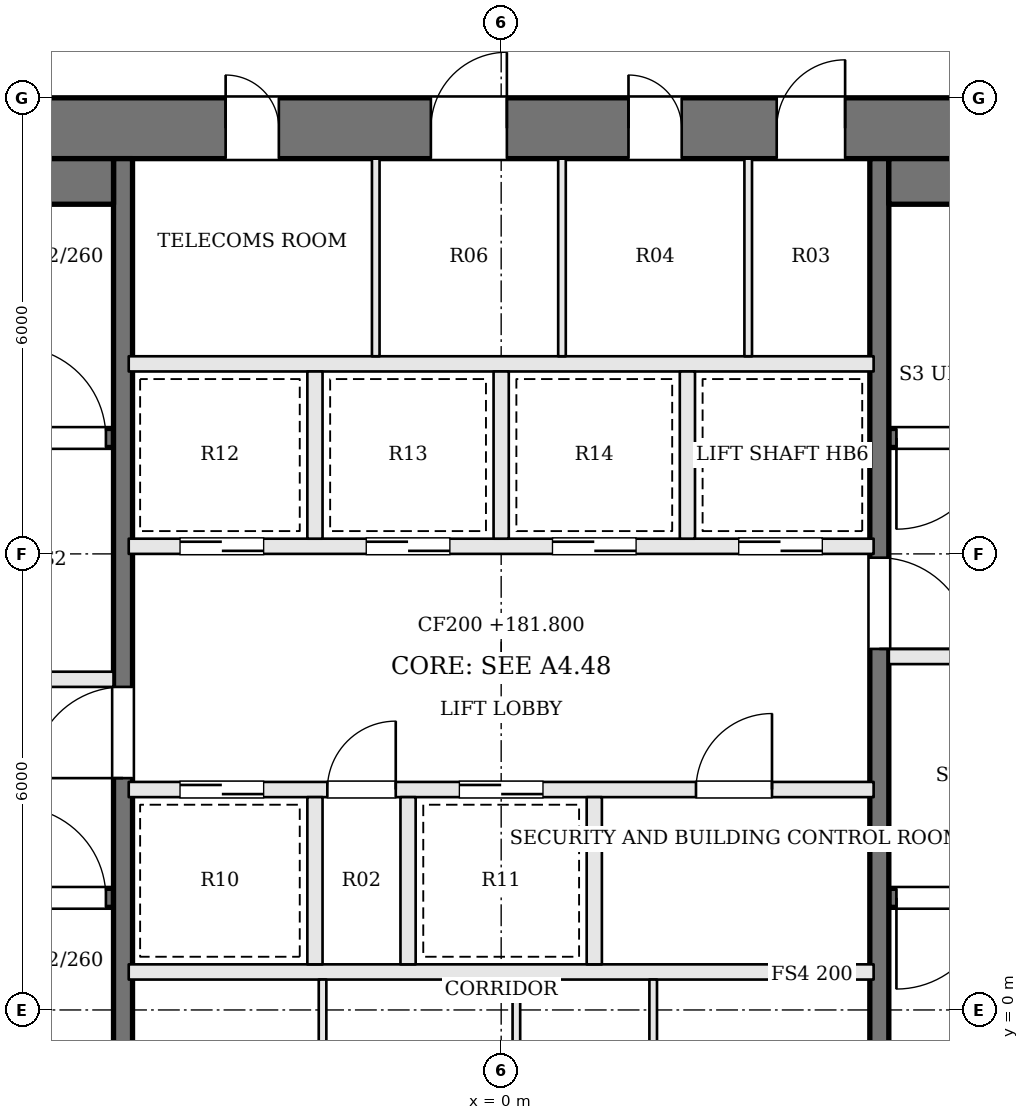
"""IFC4 building model, lengths in metres.
Left out: names, types, materials, properties, quantities, classifications, styles, units other than length and angle.
Written with IfcOpenShell. Run it as: python <this file> out.ifc"""

import sys

from ifc_helpers import new_model, si_unit, direction, frame, frame_2d, origin, place, context, subcontext, project, spatial, rectangle, extrude, element, fill, save


model = new_model("IFC4")
c1 = context("Model", 3, precision=1e-05, world=origin(), true_north=direction((0.0, 1.0)))
c2 = subcontext(c1, "Body", "Model", "MODEL_VIEW")
j1 = project(units=[si_unit("LENGTHUNIT", "METRE"), si_unit("PLANEANGLEUNIT", "RADIAN")], contexts=[c1])
p1 = place(None, origin())
s1 = spatial("IfcSite", under=j1, at=p1, CompositionType="ELEMENT")
p2 = place(p1, origin())
s2 = spatial("IfcBuilding", under=s1, at=p2, CompositionType="ELEMENT")
p3 = place(p2, frame((0.0, 0.0, 181.8)))
s3 = spatial("IfcBuildingStorey", under=s2, at=p3, CompositionType="ELEMENT", Elevation=181.8)
p4 = place(p3, frame((-13.0, 11.6, 0.0), z_axis=(0.0, 0.0, 1.0), x_axis=(1.0, 0.0, 0.0)))
e1 = element("IfcWall", 1, at=p4, inside=s3, PredefinedType="SHEAR", context=c2, shape_type="SweptSolid", body=[
    extrude(rectangle(XDim=26.0, YDim=0.8, at=frame_2d((13.0, 0.0))), origin(), (0.0, 0.0, 1.0), 3.9),
])
p5 = place(p4, frame((9.375, 0.0, 0.0)))
e2 = element("IfcOpeningElement", 2, at=p5, cuts=e1, PredefinedType="OPENING", context=c2, shape_type="SweptSolid", body=[
    extrude(rectangle(XDim=0.7, YDim=2.1, at=frame_2d((0.35, 1.05))), frame((0.0, 0.41, 0.0), z_axis=(0.0, -1.0, 0.0), x_axis=(1.0, 0.0, 0.0)), (0.0, 0.0, 1.0), 0.82),
])
p6 = place(p4, frame((12.075, 0.0, 0.0)))
e3 = element("IfcOpeningElement", 3, at=p6, cuts=e1, PredefinedType="OPENING", context=c2, shape_type="SweptSolid", body=[
    extrude(rectangle(XDim=1.0, YDim=2.1, at=frame_2d((0.5, 1.05))), frame((0.0, 0.41, 0.0), z_axis=(0.0, -1.0, 0.0), x_axis=(1.0, 0.0, 0.0)), (0.0, 0.0, 1.0), 0.82),
])
p7 = place(p4, frame((14.675, 0.0, 0.0)))
e4 = element("IfcOpeningElement", 4, at=p7, cuts=e1, PredefinedType="OPENING", context=c2, shape_type="SweptSolid", body=[
    extrude(rectangle(XDim=0.7, YDim=2.1, at=frame_2d((0.35, 1.05))), frame((0.0, 0.41, 0.0), z_axis=(0.0, -1.0, 0.0), x_axis=(1.0, 0.0, 0.0)), (0.0, 0.0, 1.0), 0.82),
])
p8 = place(p4, frame((16.625, 0.0, 0.0)))
e5 = element("IfcOpeningElement", 5, at=p8, cuts=e1, PredefinedType="OPENING", context=c2, shape_type="SweptSolid", body=[
    extrude(rectangle(XDim=0.9, YDim=2.1, at=frame_2d((0.45, 1.05))), frame((0.0, 0.41, 0.0), z_axis=(0.0, -1.0, 0.0), x_axis=(1.0, 0.0, 0.0)), (0.0, 0.0, 1.0), 0.82),
])
p9 = place(p3, frame((-12.2, 1.475, 0.0), z_axis=(0.0, 0.0, 1.0), x_axis=(1.0, 0.0, 0.0)))
e6 = element("IfcWall", 6, at=p9, inside=s3, PredefinedType="SOLIDWALL", context=c2, shape_type="SweptSolid", body=[
    extrude(rectangle(XDim=7.1, YDim=0.25, at=frame_2d((3.55, 0.0))), origin(), (0.0, 0.0, 1.0), 3.7),
])
p10 = place(p9, frame((5.8, 0.0, 0.0)))
e7 = element("IfcOpeningElement", 7, at=p10, cuts=e6, PredefinedType="OPENING", context=c2, shape_type="SweptSolid", body=[
    extrude(rectangle(XDim=1.2, YDim=2.1, at=frame_2d((0.6, 1.05))), frame((0.0, 0.135, 0.0), z_axis=(0.0, -1.0, 0.0), x_axis=(1.0, 0.0, 0.0)), (0.0, 0.0, 1.0), 0.27),
])
p11 = place(p3, frame((12.2, 7.525, 0.0), z_axis=(0.0, 0.0, 1.0), x_axis=(-1.0, 0.0, 0.0)))
e8 = element("IfcWall", 8, at=p11, inside=s3, PredefinedType="SOLIDWALL", context=c2, shape_type="SweptSolid", body=[
    extrude(rectangle(XDim=7.1, YDim=0.25, at=frame_2d((3.55, 0.0))), origin(), (0.0, 0.0, 1.0), 3.7),
])
p12 = place(p11, frame((5.8, 0.0, 0.0)))
e9 = element("IfcOpeningElement", 9, at=p12, cuts=e8, PredefinedType="OPENING", context=c2, shape_type="SweptSolid", body=[
    extrude(rectangle(XDim=1.2, YDim=2.1, at=frame_2d((0.6, 1.05))), frame((0.0, 0.135, 0.0), z_axis=(0.0, -1.0, 0.0), x_axis=(1.0, 0.0, 0.0)), (0.0, 0.0, 1.0), 0.27),
])
p13 = place(p3, frame((-12.2, 4.35, 0.0), z_axis=(0.0, 0.0, 1.0), x_axis=(1.0, 0.0, 0.0)))
e10 = element("IfcWall", 10, at=p13, inside=s3, PredefinedType="SOLIDWALL", context=c2, shape_type="SweptSolid", body=[
    extrude(rectangle(XDim=7.1, YDim=0.2, at=frame_2d((3.55, 0.0))), origin(), (0.0, 0.0, 1.0), 3.7),
])
p14 = place(p13, frame((4.4, 0.0, 0.0)))
e11 = element("IfcOpeningElement", 11, at=p14, cuts=e10, PredefinedType="OPENING", context=c2, shape_type="SweptSolid", body=[
    extrude(rectangle(XDim=1.2, YDim=2.1, at=frame_2d((0.6, 1.05))), frame((0.0, 0.11, 0.0), z_axis=(0.0, -1.0, 0.0), x_axis=(1.0, 0.0, 0.0)), (0.0, 0.0, 1.0), 0.22),
])
p15 = place(p13, frame((1.1, 0.0, 0.0)))
e12 = element("IfcOpeningElement", 12, at=p15, cuts=e10, PredefinedType="OPENING", context=c2, shape_type="SweptSolid", body=[
    extrude(rectangle(XDim=1.2, YDim=2.1, at=frame_2d((0.6, 1.05))), frame((0.0, 0.11, 0.0), z_axis=(0.0, -1.0, 0.0), x_axis=(1.0, 0.0, 0.0)), (0.0, 0.0, 1.0), 0.22),
])
p16 = place(p3, frame((12.2, 4.65, 0.0), z_axis=(0.0, 0.0, 1.0), x_axis=(-1.0, 0.0, 0.0)))
e13 = element("IfcWall", 13, at=p16, inside=s3, PredefinedType="SOLIDWALL", context=c2, shape_type="SweptSolid", body=[
    extrude(rectangle(XDim=7.1, YDim=0.2, at=frame_2d((3.55, 0.0))), origin(), (0.0, 0.0, 1.0), 3.7),
])
p17 = place(p16, frame((4.4, 0.0, 0.0)))
e14 = element("IfcOpeningElement", 14, at=p17, cuts=e13, PredefinedType="OPENING", context=c2, shape_type="SweptSolid", body=[
    extrude(rectangle(XDim=1.2, YDim=2.1, at=frame_2d((0.6, 1.05))), frame((0.0, 0.11, 0.0), z_axis=(0.0, -1.0, 0.0), x_axis=(1.0, 0.0, 0.0)), (0.0, 0.0, 1.0), 0.22),
])
p18 = place(p16, frame((1.1, 0.0, 0.0)))
e15 = element("IfcOpeningElement", 15, at=p18, cuts=e13, PredefinedType="OPENING", context=c2, shape_type="SweptSolid", body=[
    extrude(rectangle(XDim=1.2, YDim=2.1, at=frame_2d((0.6, 1.05))), frame((0.0, 0.11, 0.0), z_axis=(0.0, -1.0, 0.0), x_axis=(1.0, 0.0, 0.0)), (0.0, 0.0, 1.0), 0.22),
])
p19 = place(p3, frame((-12.2, 7.525, 0.0), z_axis=(0.0, 0.0, 1.0), x_axis=(1.0, 0.0, 0.0)))
e16 = element("IfcWall", 16, at=p19, inside=s3, PredefinedType="SOLIDWALL", context=c2, shape_type="SweptSolid", body=[
    extrude(rectangle(XDim=7.1, YDim=0.25, at=frame_2d((3.55, 0.0))), origin(), (0.0, 0.0, 1.0), 3.7),
])
p20 = place(p19, frame((5.8, 0.0, 0.0)))
e17 = element("IfcOpeningElement", 17, at=p20, cuts=e16, PredefinedType="OPENING", context=c2, shape_type="SweptSolid", body=[
    extrude(rectangle(XDim=1.2, YDim=2.1, at=frame_2d((0.6, 1.05))), frame((0.0, 0.135, 0.0), z_axis=(0.0, -1.0, 0.0), x_axis=(1.0, 0.0, 0.0)), (0.0, 0.0, 1.0), 0.27),
])
p21 = place(p3, frame((12.2, 1.475, 0.0), z_axis=(0.0, 0.0, 1.0), x_axis=(-1.0, 0.0, 0.0)))
e18 = element("IfcWall", 18, at=p21, inside=s3, PredefinedType="SOLIDWALL", context=c2, shape_type="SweptSolid", body=[
    extrude(rectangle(XDim=7.1, YDim=0.25, at=frame_2d((3.55, 0.0))), origin(), (0.0, 0.0, 1.0), 3.7),
])
p22 = place(p21, frame((5.8, 0.0, 0.0)))
e19 = element("IfcOpeningElement", 19, at=p22, cuts=e18, PredefinedType="OPENING", context=c2, shape_type="SweptSolid", body=[
    extrude(rectangle(XDim=1.2, YDim=2.1, at=frame_2d((0.6, 1.05))), frame((0.0, 0.135, 0.0), z_axis=(0.0, -1.0, 0.0), x_axis=(1.0, 0.0, 0.0)), (0.0, 0.0, 1.0), 0.27),
])
p23 = place(p3, frame((-4.975, -2.2, 0.0), z_axis=(0.0, 0.0, 1.0), x_axis=(0.0, 1.0, 0.0)))
e20 = element("IfcWall", 20, at=p23, inside=s3, PredefinedType="SOLIDWALL", context=c2, shape_type="SweptSolid", body=[
    extrude(rectangle(XDim=13.4, YDim=0.25, at=frame_2d((6.7, 0.0))), origin(), (0.0, 0.0, 1.0), 3.7),
])
p24 = place(p23, frame((5.25, 0.0, 0.0)))
e21 = element("IfcOpeningElement", 21, at=p24, cuts=e20, PredefinedType="OPENING", context=c2, shape_type="SweptSolid", body=[
    extrude(rectangle(XDim=1.2, YDim=2.1, at=frame_2d((0.6, 1.05))), frame((0.0, 0.135, 0.0), z_axis=(0.0, -1.0, 0.0), x_axis=(1.0, 0.0, 0.0)), (0.0, 0.0, 1.0), 0.27),
])
p25 = place(p3, frame((4.975, 11.2, 0.0), z_axis=(0.0, 0.0, 1.0), x_axis=(0.0, -1.0, 0.0)))
e22 = element("IfcWall", 22, at=p25, inside=s3, PredefinedType="SOLIDWALL", context=c2, shape_type="SweptSolid", body=[
    extrude(rectangle(XDim=13.4, YDim=0.25, at=frame_2d((6.7, 0.0))), origin(), (0.0, 0.0, 1.0), 3.7),
])
p26 = place(p25, frame((5.25, 0.0, 0.0)))
e23 = element("IfcOpeningElement", 23, at=p26, cuts=e22, PredefinedType="OPENING", context=c2, shape_type="SweptSolid", body=[
    extrude(rectangle(XDim=1.2, YDim=2.1, at=frame_2d((0.6, 1.05))), frame((0.0, 0.135, 0.0), z_axis=(0.0, -1.0, 0.0), x_axis=(1.0, 0.0, 0.0)), (0.0, 0.0, 1.0), 0.27),
])
for number, where, z_axis, x_axis in (
    (24, (-12.2, 10.9, 0.0), (0.0, 0.0, 1.0), (1.0, 0.0, 0.0)),
    (25, (12.2, 10.9, 0.0), (0.0, 0.0, 1.0), (-1.0, 0.0, 0.0)),
):
    element("IfcWall", number, at=place(p3, frame(where, z_axis=z_axis, x_axis=x_axis)), inside=s3, PredefinedType="SOLIDWALL", context=c2, shape_type="SweptSolid", body=[
        extrude(rectangle(XDim=7.1, YDim=0.6, at=frame_2d((3.55, 0.0))), origin(), (0.0, 0.0, 1.0), 3.7),
    ])
p27 = place(p3, frame((-4.9, 0.5, 0.0), z_axis=(0.0, 0.0, 1.0), x_axis=(1.0, 0.0, 0.0)))
e26 = element("IfcWall", 26, at=p27, inside=s3, PredefinedType="SOLIDWALL", context=c2, shape_type="SweptSolid", body=[
    extrude(rectangle(XDim=9.8, YDim=0.2, at=frame_2d((4.9, 0.0))), origin(), (0.0, 0.0, 1.0), 3.7),
])
p28 = place(p3, frame((-4.9, 2.9, 0.0), z_axis=(0.0, 0.0, 1.0), x_axis=(1.0, 0.0, 0.0)))
e27 = element("IfcWall", 27, at=p28, inside=s3, PredefinedType="SOLIDWALL", context=c2, shape_type="SweptSolid", body=[
    extrude(rectangle(XDim=9.8, YDim=0.2, at=frame_2d((4.9, 0.0))), origin(), (0.0, 0.0, 1.0), 3.7),
])
p29 = place(p28, frame((0.675, 0.0, 0.0)))
e28 = element("IfcOpeningElement", 28, at=p29, cuts=e27, PredefinedType="OPENING", context=c2, shape_type="SweptSolid", body=[
    extrude(rectangle(XDim=1.1, YDim=2.1, at=frame_2d((0.55, 1.05))), frame((0.0, 0.11, 0.0), z_axis=(0.0, -1.0, 0.0), x_axis=(1.0, 0.0, 0.0)), (0.0, 0.0, 1.0), 0.22),
])
p30 = place(p28, frame((2.613, 0.0, 0.0)))
e29 = element("IfcOpeningElement", 29, at=p30, cuts=e27, PredefinedType="OPENING", context=c2, shape_type="SweptSolid", body=[
    extrude(rectangle(XDim=0.9, YDim=2.1, at=frame_2d((0.45, 1.05))), frame((0.0, 0.11, 0.0), z_axis=(0.0, -1.0, 0.0), x_axis=(1.0, 0.0, 0.0)), (0.0, 0.0, 1.0), 0.22),
])
p31 = place(p28, frame((4.35, 0.0, 0.0)))
e30 = element("IfcOpeningElement", 30, at=p31, cuts=e27, PredefinedType="OPENING", context=c2, shape_type="SweptSolid", body=[
    extrude(rectangle(XDim=1.1, YDim=2.1, at=frame_2d((0.55, 1.05))), frame((0.0, 0.11, 0.0), z_axis=(0.0, -1.0, 0.0), x_axis=(1.0, 0.0, 0.0)), (0.0, 0.0, 1.0), 0.22),
])
p32 = place(p28, frame((7.463, 0.0, 0.0)))
e31 = element("IfcOpeningElement", 31, at=p32, cuts=e27, PredefinedType="OPENING", context=c2, shape_type="SweptSolid", body=[
    extrude(rectangle(XDim=1.0, YDim=2.1, at=frame_2d((0.5, 1.05))), frame((0.0, 0.11, 0.0), z_axis=(0.0, -1.0, 0.0), x_axis=(1.0, 0.0, 0.0)), (0.0, 0.0, 1.0), 0.22),
])
p33 = place(p3, frame((-4.9, 6.1, 0.0), z_axis=(0.0, 0.0, 1.0), x_axis=(1.0, 0.0, 0.0)))
e32 = element("IfcWall", 32, at=p33, inside=s3, PredefinedType="SOLIDWALL", context=c2, shape_type="SweptSolid", body=[
    extrude(rectangle(XDim=9.8, YDim=0.2, at=frame_2d((4.9, 0.0))), origin(), (0.0, 0.0, 1.0), 3.7),
])
p34 = place(p33, frame((0.675, 0.0, 0.0)))
e33 = element("IfcOpeningElement", 33, at=p34, cuts=e32, PredefinedType="OPENING", context=c2, shape_type="SweptSolid", body=[
    extrude(rectangle(XDim=1.1, YDim=2.1, at=frame_2d((0.55, 1.05))), frame((0.0, 0.11, 0.0), z_axis=(0.0, -1.0, 0.0), x_axis=(1.0, 0.0, 0.0)), (0.0, 0.0, 1.0), 0.22),
])
p35 = place(p33, frame((3.125, 0.0, 0.0)))
e34 = element("IfcOpeningElement", 34, at=p35, cuts=e32, PredefinedType="OPENING", context=c2, shape_type="SweptSolid", body=[
    extrude(rectangle(XDim=1.1, YDim=2.1, at=frame_2d((0.55, 1.05))), frame((0.0, 0.11, 0.0), z_axis=(0.0, -1.0, 0.0), x_axis=(1.0, 0.0, 0.0)), (0.0, 0.0, 1.0), 0.22),
])
p36 = place(p33, frame((5.575, 0.0, 0.0)))
e35 = element("IfcOpeningElement", 35, at=p36, cuts=e32, PredefinedType="OPENING", context=c2, shape_type="SweptSolid", body=[
    extrude(rectangle(XDim=1.1, YDim=2.1, at=frame_2d((0.55, 1.05))), frame((0.0, 0.11, 0.0), z_axis=(0.0, -1.0, 0.0), x_axis=(1.0, 0.0, 0.0)), (0.0, 0.0, 1.0), 0.22),
])
p37 = place(p33, frame((8.025, 0.0, 0.0)))
e36 = element("IfcOpeningElement", 36, at=p37, cuts=e32, PredefinedType="OPENING", context=c2, shape_type="SweptSolid", body=[
    extrude(rectangle(XDim=1.1, YDim=2.1, at=frame_2d((0.55, 1.05))), frame((0.0, 0.11, 0.0), z_axis=(0.0, -1.0, 0.0), x_axis=(1.0, 0.0, 0.0)), (0.0, 0.0, 1.0), 0.22),
])
p38 = place(p3, frame((-4.9, 8.5, 0.0), z_axis=(0.0, 0.0, 1.0), x_axis=(1.0, 0.0, 0.0)))
e37 = element("IfcWall", 37, at=p38, inside=s3, PredefinedType="SOLIDWALL", context=c2, shape_type="SweptSolid", body=[
    extrude(rectangle(XDim=9.8, YDim=0.2, at=frame_2d((4.9, 0.0))), origin(), (0.0, 0.0, 1.0), 3.7),
])
for number, where, z_axis, x_axis in (
    (38, (-2.45, 0.6, 0.0), (0.0, 0.0, 1.0), (0.0, 1.0, 0.0)),
    (39, (-1.225, 0.6, 0.0), (0.0, 0.0, 1.0), (0.0, 1.0, 0.0)),
    (40, (1.225, 0.6, 0.0), (0.0, 0.0, 1.0), (0.0, 1.0, 0.0)),
    (41, (-2.45, 6.2, 0.0), (0.0, 0.0, 1.0), (0.0, 1.0, 0.0)),
    (42, (0.0, 6.2, 0.0), (0.0, 0.0, 1.0), (0.0, 1.0, 0.0)),
    (43, (2.45, 6.2, 0.0), (0.0, 0.0, 1.0), (0.0, 1.0, 0.0)),
):
    element("IfcWall", number, at=place(p3, frame(where, z_axis=z_axis, x_axis=x_axis)), inside=s3, PredefinedType="SOLIDWALL", context=c2, shape_type="SweptSolid", body=[
        extrude(rectangle(XDim=2.2, YDim=0.2, at=frame_2d((1.1, 0.0))), origin(), (0.0, 0.0, 1.0), 3.7),
    ])
for number, where, z_axis, x_axis in (
    (44, (-2.35, -2.2, 0.0), (0.0, 0.0, 1.0), (0.0, 1.0, 0.0)),
    (45, (0.2, -2.2, 0.0), (0.0, 0.0, 1.0), (0.0, 1.0, 0.0)),
    (46, (2.0, -2.2, 0.0), (0.0, 0.0, 1.0), (0.0, 1.0, 0.0)),
    (47, (-1.65, 8.6, 0.0), (0.0, 0.0, 1.0), (0.0, 1.0, 0.0)),
    (48, (0.8, 8.6, 0.0), (0.0, 0.0, 1.0), (0.0, 1.0, 0.0)),
    (49, (3.25, 8.6, 0.0), (0.0, 0.0, 1.0), (0.0, 1.0, 0.0)),
):
    element("IfcWall", number, at=place(p3, frame(where, z_axis=z_axis, x_axis=x_axis)), inside=s3, PredefinedType="PARTITIONING", context=c2, shape_type="SweptSolid", body=[
        extrude(rectangle(XDim=2.6, YDim=0.1, at=frame_2d((1.3, 0.0))), origin(), (0.0, 0.0, 1.0), 3.7),
    ])
p39 = place(p24, origin())
e50 = element("IfcDoor", 50, at=p39, inside=s3, OperationType="SINGLE_SWING_LEFT", PredefinedType="DOOR", context=c2, shape_type="SweptSolid", body=[
    extrude(rectangle(XDim=1.2, YDim=2.1, at=frame_2d((0.6, 1.05))), frame((0.0, 0.025, 0.0), z_axis=(0.0, -1.0, 0.0), x_axis=(1.0, 0.0, 0.0)), (0.0, 0.0, 1.0), 0.05),
])
fill(e21, e50)
p40 = place(p26, origin())
e51 = element("IfcDoor", 51, at=p40, inside=s3, OperationType="SINGLE_SWING_RIGHT", PredefinedType="DOOR", context=c2, shape_type="SweptSolid", body=[
    extrude(rectangle(XDim=1.2, YDim=2.1, at=frame_2d((0.6, 1.05))), frame((0.0, 0.025, 0.0), z_axis=(0.0, -1.0, 0.0), x_axis=(1.0, 0.0, 0.0)), (0.0, 0.0, 1.0), 0.05),
])
fill(e23, e51)
p41 = place(p10, origin())
e52 = element("IfcDoor", 52, at=p41, inside=s3, OperationType="SINGLE_SWING_LEFT", PredefinedType="DOOR", context=c2, shape_type="SweptSolid", body=[
    extrude(rectangle(XDim=1.2, YDim=2.1, at=frame_2d((0.6, 1.05))), frame((0.0, 0.025, 0.0), z_axis=(0.0, -1.0, 0.0), x_axis=(1.0, 0.0, 0.0)), (0.0, 0.0, 1.0), 0.05),
])
fill(e7, e52)
p42 = place(p12, origin())
e53 = element("IfcDoor", 53, at=p42, inside=s3, OperationType="SINGLE_SWING_RIGHT", PredefinedType="DOOR", context=c2, shape_type="SweptSolid", body=[
    extrude(rectangle(XDim=1.2, YDim=2.1, at=frame_2d((0.6, 1.05))), frame((0.0, 0.025, 0.0), z_axis=(0.0, -1.0, 0.0), x_axis=(1.0, 0.0, 0.0)), (0.0, 0.0, 1.0), 0.05),
])
fill(e9, e53)
p43 = place(p20, origin())
e54 = element("IfcDoor", 54, at=p43, inside=s3, OperationType="SINGLE_SWING_LEFT", PredefinedType="DOOR", context=c2, shape_type="SweptSolid", body=[
    extrude(rectangle(XDim=1.2, YDim=2.1, at=frame_2d((0.6, 1.05))), frame((0.0, 0.025, 0.0), z_axis=(0.0, -1.0, 0.0), x_axis=(1.0, 0.0, 0.0)), (0.0, 0.0, 1.0), 0.05),
])
fill(e17, e54)
p44 = place(p22, origin())
e55 = element("IfcDoor", 55, at=p44, inside=s3, OperationType="SINGLE_SWING_RIGHT", PredefinedType="DOOR", context=c2, shape_type="SweptSolid", body=[
    extrude(rectangle(XDim=1.2, YDim=2.1, at=frame_2d((0.6, 1.05))), frame((0.0, 0.025, 0.0), z_axis=(0.0, -1.0, 0.0), x_axis=(1.0, 0.0, 0.0)), (0.0, 0.0, 1.0), 0.05),
])
fill(e19, e55)
p45 = place(p29, origin())
e56 = element("IfcDoor", 56, at=p45, inside=s3, OperationType="SLIDING_TO_RIGHT", PredefinedType="DOOR", context=c2, shape_type="SweptSolid", body=[
    extrude(rectangle(XDim=1.1, YDim=2.1, at=frame_2d((0.55, 1.05))), frame((0.0, 0.025, 0.0), z_axis=(0.0, -1.0, 0.0), x_axis=(1.0, 0.0, 0.0)), (0.0, 0.0, 1.0), 0.05),
])
fill(e28, e56)
p46 = place(p30, origin())
e57 = element("IfcDoor", 57, at=p46, inside=s3, OperationType="SINGLE_SWING_RIGHT", PredefinedType="DOOR", context=c2, shape_type="SweptSolid", body=[
    extrude(rectangle(XDim=0.9, YDim=2.1, at=frame_2d((0.45, 1.05))), frame((0.0, 0.025, 0.0), z_axis=(0.0, -1.0, 0.0), x_axis=(1.0, 0.0, 0.0)), (0.0, 0.0, 1.0), 0.05),
])
fill(e29, e57)
p47 = place(p31, origin())
e58 = element("IfcDoor", 58, at=p47, inside=s3, OperationType="SLIDING_TO_LEFT", PredefinedType="DOOR", context=c2, shape_type="SweptSolid", body=[
    extrude(rectangle(XDim=1.1, YDim=2.1, at=frame_2d((0.55, 1.05))), frame((0.0, 0.025, 0.0), z_axis=(0.0, -1.0, 0.0), x_axis=(1.0, 0.0, 0.0)), (0.0, 0.0, 1.0), 0.05),
])
fill(e30, e58)
p48 = place(p32, origin())
e59 = element("IfcDoor", 59, at=p48, inside=s3, OperationType="SINGLE_SWING_RIGHT", PredefinedType="DOOR", context=c2, shape_type="SweptSolid", body=[
    extrude(rectangle(XDim=1.0, YDim=2.1, at=frame_2d((0.5, 1.05))), frame((0.0, 0.025, 0.0), z_axis=(0.0, -1.0, 0.0), x_axis=(1.0, 0.0, 0.0)), (0.0, 0.0, 1.0), 0.05),
])
fill(e31, e59)
p49 = place(p34, origin())
e60 = element("IfcDoor", 60, at=p49, inside=s3, OperationType="SLIDING_TO_RIGHT", PredefinedType="DOOR", context=c2, shape_type="SweptSolid", body=[
    extrude(rectangle(XDim=1.1, YDim=2.1, at=frame_2d((0.55, 1.05))), frame((0.0, 0.025, 0.0), z_axis=(0.0, -1.0, 0.0), x_axis=(1.0, 0.0, 0.0)), (0.0, 0.0, 1.0), 0.05),
])
fill(e33, e60)
p50 = place(p35, origin())
e61 = element("IfcDoor", 61, at=p50, inside=s3, OperationType="SLIDING_TO_LEFT", PredefinedType="DOOR", context=c2, shape_type="SweptSolid", body=[
    extrude(rectangle(XDim=1.1, YDim=2.1, at=frame_2d((0.55, 1.05))), frame((0.0, 0.025, 0.0), z_axis=(0.0, -1.0, 0.0), x_axis=(1.0, 0.0, 0.0)), (0.0, 0.0, 1.0), 0.05),
])
fill(e34, e61)
p51 = place(p36, origin())
e62 = element("IfcDoor", 62, at=p51, inside=s3, OperationType="SLIDING_TO_RIGHT", PredefinedType="DOOR", context=c2, shape_type="SweptSolid", body=[
    extrude(rectangle(XDim=1.1, YDim=2.1, at=frame_2d((0.55, 1.05))), frame((0.0, 0.025, 0.0), z_axis=(0.0, -1.0, 0.0), x_axis=(1.0, 0.0, 0.0)), (0.0, 0.0, 1.0), 0.05),
])
fill(e35, e62)
p52 = place(p37, origin())
e63 = element("IfcDoor", 63, at=p52, inside=s3, OperationType="SLIDING_TO_LEFT", PredefinedType="DOOR", context=c2, shape_type="SweptSolid", body=[
    extrude(rectangle(XDim=1.1, YDim=2.1, at=frame_2d((0.55, 1.05))), frame((0.0, 0.025, 0.0), z_axis=(0.0, -1.0, 0.0), x_axis=(1.0, 0.0, 0.0)), (0.0, 0.0, 1.0), 0.05),
])
fill(e36, e63)
p53 = place(p5, origin())
e64 = element("IfcDoor", 64, at=p53, inside=s3, OperationType="SINGLE_SWING_LEFT", PredefinedType="DOOR", context=c2, shape_type="SweptSolid", body=[
    extrude(rectangle(XDim=0.7, YDim=2.1, at=frame_2d((0.35, 1.05))), frame((0.0, 0.025, 0.0), z_axis=(0.0, -1.0, 0.0), x_axis=(1.0, 0.0, 0.0)), (0.0, 0.0, 1.0), 0.05),
])
fill(e2, e64)
p54 = place(p6, origin())
e65 = element("IfcDoor", 65, at=p54, inside=s3, OperationType="SINGLE_SWING_RIGHT", PredefinedType="DOOR", context=c2, shape_type="SweptSolid", body=[
    extrude(rectangle(XDim=1.0, YDim=2.1, at=frame_2d((0.5, 1.05))), frame((0.0, 0.025, 0.0), z_axis=(0.0, -1.0, 0.0), x_axis=(1.0, 0.0, 0.0)), (0.0, 0.0, 1.0), 0.05),
])
fill(e3, e65)
p55 = place(p7, origin())
e66 = element("IfcDoor", 66, at=p55, inside=s3, OperationType="SINGLE_SWING_LEFT", PredefinedType="DOOR", context=c2, shape_type="SweptSolid", body=[
    extrude(rectangle(XDim=0.7, YDim=2.1, at=frame_2d((0.35, 1.05))), frame((0.0, 0.025, 0.0), z_axis=(0.0, -1.0, 0.0), x_axis=(1.0, 0.0, 0.0)), (0.0, 0.0, 1.0), 0.05),
])
fill(e4, e66)
p56 = place(p8, origin())
e67 = element("IfcDoor", 67, at=p56, inside=s3, OperationType="SINGLE_SWING_RIGHT", PredefinedType="DOOR", context=c2, shape_type="SweptSolid", body=[
    extrude(rectangle(XDim=0.9, YDim=2.1, at=frame_2d((0.45, 1.05))), frame((0.0, 0.025, 0.0), z_axis=(0.0, -1.0, 0.0), x_axis=(1.0, 0.0, 0.0)), (0.0, 0.0, 1.0), 0.05),
])
fill(e5, e67)
save(model, sys.argv[1])
